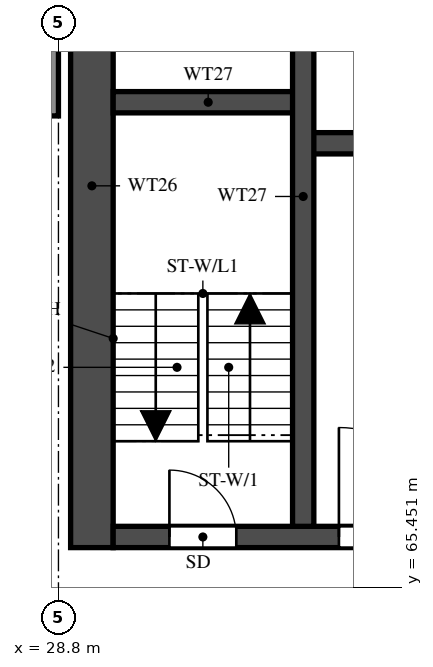
"""IFC4 building model, lengths in metres.
Left out: names, types, materials, properties, quantities, classifications, styles, units other than length and angle.
Written with IfcOpenShell. Run it as: python <this file> out.ifc"""

import sys

from ifc_helpers import new_model, si_unit, direction, frame, frame_2d, origin, place, context, subcontext, project, spatial, rectangle, extrude, element, fill, save


model = new_model("IFC4")
c1 = context("Model", 3, precision=1e-05, world=origin(), true_north=direction((0.0, 1.0)))
c2 = subcontext(c1, "Body", "Model", "MODEL_VIEW")
j1 = project(units=[si_unit("LENGTHUNIT", "METRE"), si_unit("PLANEANGLEUNIT", "RADIAN")], contexts=[c1])
p1 = place(None, origin())
s1 = spatial("IfcSite", under=j1, at=p1, CompositionType="ELEMENT")
p2 = place(p1, origin())
s2 = spatial("IfcBuilding", under=s1, at=p2, CompositionType="ELEMENT")
p3 = place(p2, frame((0.0, 0.0, 116.5)))
s3 = spatial("IfcBuildingStorey", under=s2, at=p3, CompositionType="ELEMENT", Elevation=116.5)
p4 = place(p3, frame((29.35, 66.1, 0.0), z_axis=(0.0, 0.0, 1.0), x_axis=(0.0, 1.0, 0.0)))
e1 = element("IfcWall", 1, at=p4, inside=s3, PredefinedType="SHEAR", context=c2, shape_type="SweptSolid", body=[
    extrude(rectangle(XDim=11.9, YDim=0.7, at=frame_2d((5.95, 0.0))), origin(), (0.0, 0.0, 1.0), 3.2),
])
p5 = place(p3, frame((29.7, 66.275, 0.0), z_axis=(0.0, 0.0, 1.0), x_axis=(1.0, 0.0, 0.0)))
e2 = element("IfcWall", 2, at=p5, inside=s3, PredefinedType="SHEAR", context=c2, shape_type="SweptSolid", body=[
    extrude(rectangle(XDim=41.4, YDim=0.35, at=frame_2d((20.7, 0.0))), origin(), (0.0, 0.0, 1.0), 3.2),
])
p6 = place(p5, frame((0.925, 0.0, 0.0)))
e3 = element("IfcOpeningElement", 3, at=p6, cuts=e2, PredefinedType="OPENING", context=c2, shape_type="SweptSolid", body=[
    extrude(rectangle(XDim=1.1, YDim=2.1, at=frame_2d((0.55, 1.05))), frame((0.0, 0.185, 0.0), z_axis=(0.0, -1.0, 0.0), x_axis=(1.0, 0.0, 0.0)), (0.0, 0.0, 1.0), 0.37),
])
p7 = place(p5, frame((3.712, 0.0, 0.0)))
e4 = element("IfcOpeningElement", 4, at=p7, cuts=e2, PredefinedType="OPENING", context=c2, shape_type="SweptSolid", body=[
    extrude(rectangle(XDim=1.8, YDim=2.1, at=frame_2d((0.9, 1.05))), frame((0.0, 0.185, 0.0), z_axis=(0.0, -1.0, 0.0), x_axis=(1.0, 0.0, 0.0)), (0.0, 0.0, 1.0), 0.37),
])
p8 = place(p3, frame((32.825, 72.75, 0.0), z_axis=(0.0, 0.0, 1.0), x_axis=(1.0, 0.0, 0.0)))
e5 = element("IfcWall", 5, at=p8, inside=s3, PredefinedType="SHEAR", context=c2, shape_type="SweptSolid", body=[
    extrude(rectangle(XDim=35.15, YDim=0.35, at=frame_2d((17.575, 0.0))), origin(), (0.0, 0.0, 1.0), 3.2),
])
p9 = place(p8, frame((19.8, 0.0, 0.0)))
e6 = element("IfcOpeningElement", 6, at=p9, cuts=e5, PredefinedType="OPENING", context=c2, shape_type="SweptSolid", body=[
    extrude(rectangle(XDim=1.1, YDim=2.1, at=frame_2d((0.55, 1.05))), frame((0.0, 0.185, 0.0), z_axis=(0.0, -1.0, 0.0), x_axis=(1.0, 0.0, 0.0)), (0.0, 0.0, 1.0), 0.37),
])
p10 = place(p8, frame((27.7, 0.0, 0.0)))
e7 = element("IfcOpeningElement", 7, at=p10, cuts=e5, PredefinedType="OPENING", context=c2, shape_type="SweptSolid", body=[
    extrude(rectangle(XDim=1.1, YDim=2.1, at=frame_2d((0.55, 1.05))), frame((0.0, 0.185, 0.0), z_axis=(0.0, -1.0, 0.0), x_axis=(1.0, 0.0, 0.0)), (0.0, 0.0, 1.0), 0.37),
])
p11 = place(p8, frame((30.3, 0.0, 0.0)))
e8 = element("IfcOpeningElement", 8, at=p11, cuts=e5, PredefinedType="OPENING", context=c2, shape_type="SweptSolid", body=[
    extrude(rectangle(XDim=1.1, YDim=2.1, at=frame_2d((0.55, 1.05))), frame((0.0, 0.185, 0.0), z_axis=(0.0, -1.0, 0.0), x_axis=(1.0, 0.0, 0.0)), (0.0, 0.0, 1.0), 0.37),
])
p12 = place(p8, frame((3.8, 0.0, 0.0)))
e9 = element("IfcOpeningElement", 9, at=p12, cuts=e5, PredefinedType="OPENING", context=c2, shape_type="SweptSolid", body=[
    extrude(rectangle(XDim=1.1, YDim=2.1, at=frame_2d((0.55, 1.05))), frame((0.0, 0.185, 0.0), z_axis=(0.0, -1.0, 0.0), x_axis=(1.0, 0.0, 0.0)), (0.0, 0.0, 1.0), 0.37),
])
p13 = place(p8, frame((6.55, 0.0, 0.0)))
e10 = element("IfcOpeningElement", 10, at=p13, cuts=e5, PredefinedType="OPENING", context=c2, shape_type="SweptSolid", body=[
    extrude(rectangle(XDim=1.1, YDim=2.1, at=frame_2d((0.55, 1.05))), frame((0.0, 0.185, 0.0), z_axis=(0.0, -1.0, 0.0), x_axis=(1.0, 0.0, 0.0)), (0.0, 0.0, 1.0), 0.37),
])
p14 = place(p8, frame((9.3, 0.0, 0.0)))
e11 = element("IfcOpeningElement", 11, at=p14, cuts=e5, PredefinedType="OPENING", context=c2, shape_type="SweptSolid", body=[
    extrude(rectangle(XDim=1.1, YDim=2.1, at=frame_2d((0.55, 1.05))), frame((0.0, 0.185, 0.0), z_axis=(0.0, -1.0, 0.0), x_axis=(1.0, 0.0, 0.0)), (0.0, 0.0, 1.0), 0.37),
])
p15 = place(p8, frame((12.05, 0.0, 0.0)))
e12 = element("IfcOpeningElement", 12, at=p15, cuts=e5, PredefinedType="OPENING", context=c2, shape_type="SweptSolid", body=[
    extrude(rectangle(XDim=1.1, YDim=2.1, at=frame_2d((0.55, 1.05))), frame((0.0, 0.185, 0.0), z_axis=(0.0, -1.0, 0.0), x_axis=(1.0, 0.0, 0.0)), (0.0, 0.0, 1.0), 0.37),
])
p16 = place(p8, frame((14.8, 0.0, 0.0)))
e13 = element("IfcOpeningElement", 13, at=p16, cuts=e5, PredefinedType="OPENING", context=c2, shape_type="SweptSolid", body=[
    extrude(rectangle(XDim=1.1, YDim=2.1, at=frame_2d((0.55, 1.05))), frame((0.0, 0.185, 0.0), z_axis=(0.0, -1.0, 0.0), x_axis=(1.0, 0.0, 0.0)), (0.0, 0.0, 1.0), 0.37),
])
p17 = place(p8, frame((17.55, 0.0, 0.0)))
e14 = element("IfcOpeningElement", 14, at=p17, cuts=e5, PredefinedType="OPENING", context=c2, shape_type="SweptSolid", body=[
    extrude(rectangle(XDim=1.1, YDim=2.1, at=frame_2d((0.55, 1.05))), frame((0.0, 0.185, 0.0), z_axis=(0.0, -1.0, 0.0), x_axis=(1.0, 0.0, 0.0)), (0.0, 0.0, 1.0), 0.37),
])
p18 = place(p8, frame((0.938, 0.0, 0.0)))
e15 = element("IfcOpeningElement", 15, at=p18, cuts=e5, PredefinedType="OPENING", context=c2, shape_type="SweptSolid", body=[
    extrude(rectangle(XDim=1.1, YDim=2.1, at=frame_2d((0.55, 1.05))), frame((0.0, 0.185, 0.0), z_axis=(0.0, -1.0, 0.0), x_axis=(1.0, 0.0, 0.0)), (0.0, 0.0, 1.0), 0.37),
])
p19 = place(p3, frame((29.7, 73.425, 0.0), z_axis=(0.0, 0.0, 1.0), x_axis=(1.0, 0.0, 0.0)))
e16 = element("IfcWall", 16, at=p19, inside=s3, PredefinedType="SHEAR", context=c2, shape_type="SweptSolid", body=[
    extrude(rectangle(XDim=3.125, YDim=0.35, at=frame_2d((1.562, 0.0))), origin(), (0.0, 0.0, 1.0), 3.2),
])
p20 = place(p3, frame((32.825, 66.45, 0.0), z_axis=(0.0, 0.0, 1.0), x_axis=(0.0, 1.0, 0.0)))
e17 = element("IfcWall", 17, at=p20, inside=s3, PredefinedType="SHEAR", context=c2, shape_type="SweptSolid", body=[
    extrude(rectangle(XDim=10.85, YDim=0.35, at=frame_2d((5.425, 0.0))), origin(), (0.0, 0.0, 1.0), 3.2),
])
p21 = place(p3, frame((28.7, 73.2, 0.0), z_axis=(0.0, 0.0, 1.0), x_axis=(0.0, 1.0, 0.0)))
e18 = element("IfcWall", 18, at=p21, inside=s3, PredefinedType="SOLIDWALL", context=c2, shape_type="SweptSolid", body=[
    extrude(rectangle(XDim=4.8, YDim=0.2, at=frame_2d((2.4, 0.0))), origin(), (0.0, 0.0, 1.0), 3.2),
])
p22 = place(p6, origin())
e19 = element("IfcDoor", 19, at=p22, inside=s3, OperationType="SINGLE_SWING_LEFT", PredefinedType="DOOR", context=c2, shape_type="SweptSolid", body=[
    extrude(rectangle(XDim=1.1, YDim=2.1, at=frame_2d((0.55, 1.05))), frame((0.0, 0.025, 0.0), z_axis=(0.0, -1.0, 0.0), x_axis=(1.0, 0.0, 0.0)), (0.0, 0.0, 1.0), 0.05),
])
fill(e3, e19)
p23 = place(p7, origin())
e20 = element("IfcDoor", 20, at=p23, inside=s3, OperationType="DOUBLE_DOOR_SINGLE_SWING", PredefinedType="DOOR", context=c2, shape_type="SweptSolid", body=[
    extrude(rectangle(XDim=1.8, YDim=2.1, at=frame_2d((0.9, 1.05))), frame((0.0, 0.025, 0.0), z_axis=(0.0, -1.0, 0.0), x_axis=(1.0, 0.0, 0.0)), (0.0, 0.0, 1.0), 0.05),
])
fill(e4, e20)
save(model, sys.argv[1])
